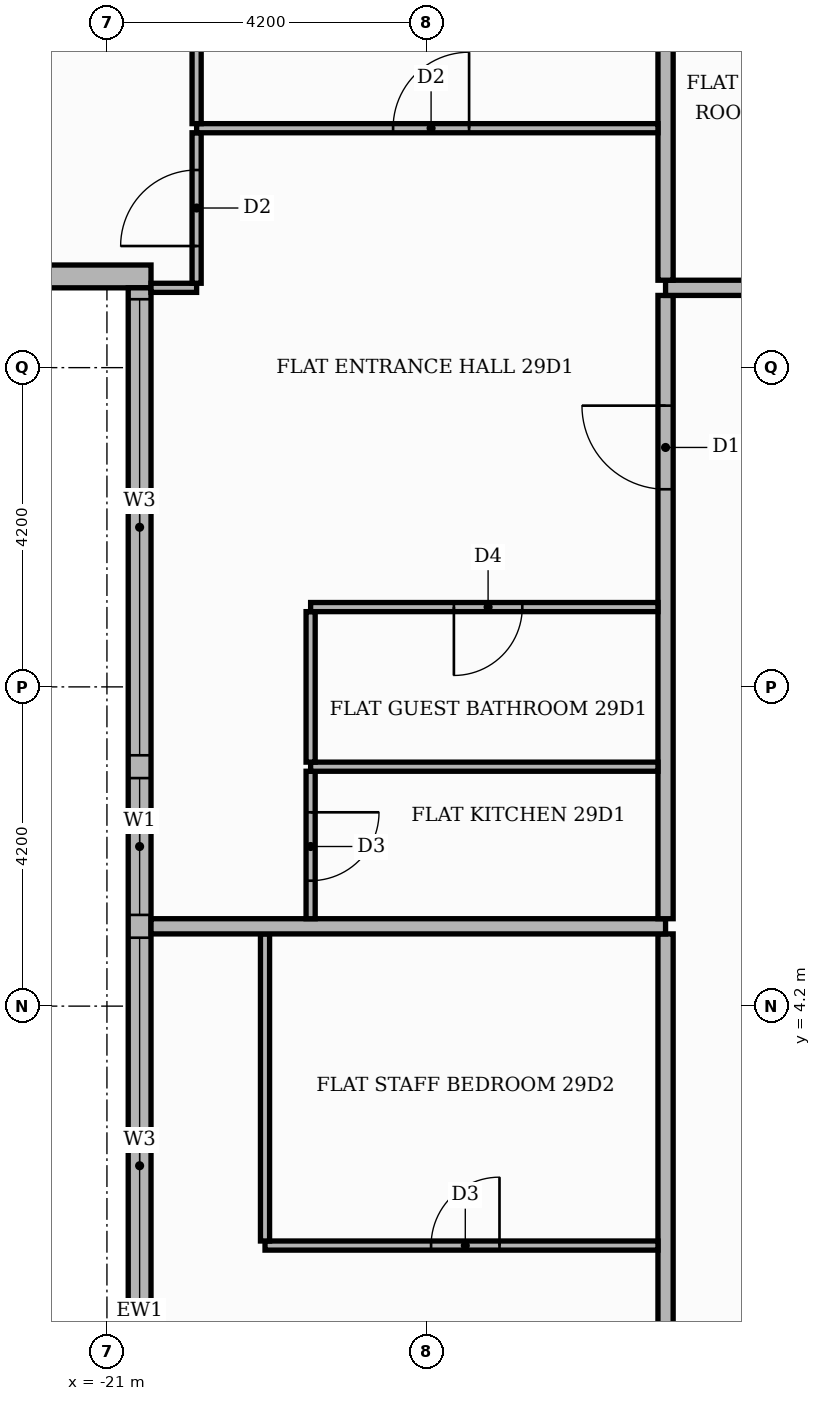
"""IFC4 building model, lengths in metres.
Left out: names, types, materials, properties, quantities, classifications, styles, units other than length and angle.
Written with IfcOpenShell. Run it as: python <this file> out.ifc"""

import sys

from ifc_helpers import new_model, si_unit, direction, frame, frame_2d, origin, place, context, subcontext, project, spatial, rectangle, extrude, element, fill, save


model = new_model("IFC4")
c1 = context("Model", 3, precision=1e-05, world=origin(), true_north=direction((0.0, 1.0)))
c2 = subcontext(c1, "Body", "Model", "MODEL_VIEW")
j1 = project(units=[si_unit("LENGTHUNIT", "METRE"), si_unit("PLANEANGLEUNIT", "RADIAN")], contexts=[c1])
p1 = place(None, origin())
s1 = spatial("IfcSite", under=j1, at=p1, CompositionType="ELEMENT")
p2 = place(p1, origin())
s2 = spatial("IfcBuilding", under=s1, at=p2, CompositionType="ELEMENT")
p3 = place(p2, frame((0.0, 0.0, 122.1)))
s3 = spatial("IfcBuildingStorey", under=s2, at=p3, CompositionType="ELEMENT", Elevation=122.1)
p4 = place(p3, frame((-25.42, 13.8, 0.0), z_axis=(0.0, 0.0, 1.0), x_axis=(1.0, 0.0, 0.0)))
e1 = element("IfcWall", 1, at=p4, inside=s3, PredefinedType="STANDARD", context=c2, shape_type="SweptSolid", body=[
    extrude(rectangle(XDim=5.0, YDim=0.3, at=frame_2d((2.5, 0.0))), origin(), (0.0, 0.0, 1.0), 3.4),
])
p5 = place(p4, frame((1.42, 0.0, 0.9)))
e2 = element("IfcOpeningElement", 2, at=p5, cuts=e1, PredefinedType="OPENING", context=c2, shape_type="SweptSolid", body=[
    extrude(rectangle(XDim=1.8, YDim=2.1, at=frame_2d((0.9, 1.05))), frame((0.0, 0.16, 0.0), z_axis=(0.0, -1.0, 0.0), x_axis=(1.0, 0.0, 0.0)), (0.0, 0.0, 1.0), 0.32),
])
p6 = place(p3, frame((-20.57, 13.65, 0.0), z_axis=(0.0, 0.0, 1.0), x_axis=(0.0, -1.0, 0.0)))
e3 = element("IfcWall", 3, at=p6, inside=s3, PredefinedType="STANDARD", context=c2, shape_type="SweptSolid", body=[
    extrude(rectangle(XDim=27.6, YDim=0.3, at=frame_2d((13.8, 0.0))), origin(), (0.0, 0.0, 1.0), 3.4),
])
p7 = place(p6, frame((0.15, 0.0, 0.9)))
e4 = element("IfcOpeningElement", 4, at=p7, cuts=e3, PredefinedType="OPENING", context=c2, shape_type="SweptSolid", body=[
    extrude(rectangle(XDim=6.0, YDim=2.1, at=frame_2d((3.0, 1.05))), frame((0.0, 0.16, 0.0), z_axis=(0.0, -1.0, 0.0), x_axis=(1.0, 0.0, 0.0)), (0.0, 0.0, 1.0), 0.32),
])
p8 = place(p6, frame((6.45, 0.0, 0.9)))
e5 = element("IfcOpeningElement", 5, at=p8, cuts=e3, PredefinedType="OPENING", context=c2, shape_type="SweptSolid", body=[
    extrude(rectangle(XDim=1.8, YDim=2.1, at=frame_2d((0.9, 1.05))), frame((0.0, 0.16, 0.0), z_axis=(0.0, -1.0, 0.0), x_axis=(1.0, 0.0, 0.0)), (0.0, 0.0, 1.0), 0.32),
])
p9 = place(p6, frame((8.55, 0.0, 0.9)))
e6 = element("IfcOpeningElement", 6, at=p9, cuts=e3, PredefinedType="OPENING", context=c2, shape_type="SweptSolid", body=[
    extrude(rectangle(XDim=6.0, YDim=2.1, at=frame_2d((3.0, 1.05))), frame((0.0, 0.16, 0.0), z_axis=(0.0, -1.0, 0.0), x_axis=(1.0, 0.0, 0.0)), (0.0, 0.0, 1.0), 0.32),
])
p10 = place(p6, frame((14.85, 0.0, 0.9)))
e7 = element("IfcOpeningElement", 7, at=p10, cuts=e3, PredefinedType="OPENING", context=c2, shape_type="SweptSolid", body=[
    extrude(rectangle(XDim=6.0, YDim=2.1, at=frame_2d((3.0, 1.05))), frame((0.0, 0.16, 0.0), z_axis=(0.0, -1.0, 0.0), x_axis=(1.0, 0.0, 0.0)), (0.0, 0.0, 1.0), 0.32),
])
p11 = place(p6, frame((21.15, 0.0, 0.9)))
e8 = element("IfcOpeningElement", 8, at=p11, cuts=e3, PredefinedType="OPENING", context=c2, shape_type="SweptSolid", body=[
    extrude(rectangle(XDim=6.0, YDim=2.1, at=frame_2d((3.0, 1.05))), frame((0.0, 0.16, 0.0), z_axis=(0.0, -1.0, 0.0), x_axis=(1.0, 0.0, 0.0)), (0.0, 0.0, 1.0), 0.32),
])
p12 = place(p3, frame((-13.65, -13.55, 0.0), z_axis=(0.0, 0.0, 1.0), x_axis=(0.0, 1.0, 0.0)))
e9 = element("IfcWall", 9, at=p12, inside=s3, PredefinedType="PARTITIONING", context=c2, shape_type="SweptSolid", body=[
    extrude(rectangle(XDim=18.7, YDim=0.2, at=frame_2d((9.35, 0.0))), origin(), (0.0, 0.0, 1.0), 3.4),
])
p13 = place(p12, frame((11.95, 0.0, 0.0)))
e10 = element("IfcOpeningElement", 10, at=p13, cuts=e9, PredefinedType="OPENING", context=c2, shape_type="SweptSolid", body=[
    extrude(rectangle(XDim=1.1, YDim=2.4, at=frame_2d((0.55, 1.2))), frame((0.0, 0.11, 0.0), z_axis=(0.0, -1.0, 0.0), x_axis=(1.0, 0.0, 0.0)), (0.0, 0.0, 1.0), 0.22),
])
p14 = place(p3, frame((-18.92, 1.05, 0.0), z_axis=(0.0, 0.0, 1.0), x_axis=(1.0, 0.0, 0.0)))
e11 = element("IfcWall", 11, at=p14, inside=s3, PredefinedType="PARTITIONING", context=c2, shape_type="SweptSolid", body=[
    extrude(rectangle(XDim=5.17, YDim=0.12, at=frame_2d((2.585, 0.0))), origin(), (0.0, 0.0, 1.0), 3.4),
])
p15 = place(p14, frame((2.185, 0.0, 0.0)))
e12 = element("IfcOpeningElement", 12, at=p15, cuts=e11, PredefinedType="OPENING", context=c2, shape_type="SweptSolid", body=[
    extrude(rectangle(XDim=0.9, YDim=2.1, at=frame_2d((0.45, 1.05))), frame((0.0, 0.07, 0.0), z_axis=(0.0, -1.0, 0.0), x_axis=(1.0, 0.0, 0.0)), (0.0, 0.0, 1.0), 0.14),
])
p16 = place(p3, frame((-18.92, 1.11, 0.0), z_axis=(0.0, 0.0, 1.0), x_axis=(0.0, 1.0, 0.0)))
e13 = element("IfcWall", 13, at=p16, inside=s3, PredefinedType="PARTITIONING", context=c2, shape_type="SweptSolid", body=[
    extrude(rectangle(XDim=4.04, YDim=0.12, at=frame_2d((2.02, 0.0))), origin(), (0.0, 0.0, 1.0), 3.4),
])
p17 = place(p3, frame((-20.42, 5.25, 0.0), z_axis=(0.0, 0.0, 1.0), x_axis=(1.0, 0.0, 0.0)))
e14 = element("IfcWall", 14, at=p17, inside=s3, PredefinedType="PARTITIONING", context=c2, shape_type="SweptSolid", body=[
    extrude(rectangle(XDim=6.77, YDim=0.2, at=frame_2d((3.385, 0.0))), origin(), (0.0, 0.0, 1.0), 3.4),
])
p18 = place(p3, frame((-18.32, 5.35, 0.0), z_axis=(0.0, 0.0, 1.0), x_axis=(0.0, 1.0, 0.0)))
e15 = element("IfcWall", 15, at=p18, inside=s3, PredefinedType="PARTITIONING", context=c2, shape_type="SweptSolid", body=[
    extrude(rectangle(XDim=1.94, YDim=0.12, at=frame_2d((0.97, 0.0))), origin(), (0.0, 0.0, 1.0), 3.4),
])
p19 = place(p18, frame((0.5, 0.0, 0.0)))
e16 = element("IfcOpeningElement", 16, at=p19, cuts=e15, PredefinedType="OPENING", context=c2, shape_type="SweptSolid", body=[
    extrude(rectangle(XDim=0.9, YDim=2.1, at=frame_2d((0.45, 1.05))), frame((0.0, 0.07, 0.0), z_axis=(0.0, -1.0, 0.0), x_axis=(1.0, 0.0, 0.0)), (0.0, 0.0, 1.0), 0.14),
])
p20 = place(p3, frame((-13.65, 5.35, 0.0), z_axis=(0.0, 0.0, 1.0), x_axis=(0.0, 1.0, 0.0)))
e17 = element("IfcWall", 17, at=p20, inside=s3, PredefinedType="PARTITIONING", context=c2, shape_type="SweptSolid", body=[
    extrude(rectangle(XDim=8.2, YDim=0.2, at=frame_2d((4.1, 0.0))), origin(), (0.0, 0.0, 1.0), 3.4),
])
p21 = place(p20, frame((5.65, 0.0, 0.0)))
e18 = element("IfcOpeningElement", 18, at=p21, cuts=e17, PredefinedType="OPENING", context=c2, shape_type="SweptSolid", body=[
    extrude(rectangle(XDim=1.1, YDim=2.4, at=frame_2d((0.55, 1.2))), frame((0.0, 0.11, 0.0), z_axis=(0.0, -1.0, 0.0), x_axis=(1.0, 0.0, 0.0)), (0.0, 0.0, 1.0), 0.22),
])
p22 = place(p3, frame((-18.32, 7.35, 0.0), z_axis=(0.0, 0.0, 1.0), x_axis=(1.0, 0.0, 0.0)))
e19 = element("IfcWall", 19, at=p22, inside=s3, PredefinedType="PARTITIONING", context=c2, shape_type="SweptSolid", body=[
    extrude(rectangle(XDim=4.57, YDim=0.12, at=frame_2d((2.285, 0.0))), origin(), (0.0, 0.0, 1.0), 3.4),
])
p23 = place(p3, frame((-18.32, 7.41, 0.0), z_axis=(0.0, 0.0, 1.0), x_axis=(0.0, 1.0, 0.0)))
e20 = element("IfcWall", 20, at=p23, inside=s3, PredefinedType="PARTITIONING", context=c2, shape_type="SweptSolid", body=[
    extrude(rectangle(XDim=1.98, YDim=0.12, at=frame_2d((0.99, 0.0))), origin(), (0.0, 0.0, 1.0), 3.4),
])
p24 = place(p3, frame((-18.32, 9.45, 0.0), z_axis=(0.0, 0.0, 1.0), x_axis=(1.0, 0.0, 0.0)))
e21 = element("IfcWall", 21, at=p24, inside=s3, PredefinedType="PARTITIONING", context=c2, shape_type="SweptSolid", body=[
    extrude(rectangle(XDim=4.57, YDim=0.12, at=frame_2d((2.285, 0.0))), origin(), (0.0, 0.0, 1.0), 3.4),
])
p25 = place(p24, frame((1.885, 0.0, 0.0)))
e22 = element("IfcOpeningElement", 22, at=p25, cuts=e21, PredefinedType="OPENING", context=c2, shape_type="SweptSolid", body=[
    extrude(rectangle(XDim=0.9, YDim=2.1, at=frame_2d((0.45, 1.05))), frame((0.0, 0.07, 0.0), z_axis=(0.0, -1.0, 0.0), x_axis=(1.0, 0.0, 0.0)), (0.0, 0.0, 1.0), 0.14),
])
p26 = place(p3, frame((-20.42, 13.65, 0.0), z_axis=(0.0, 0.0, 1.0), x_axis=(1.0, 0.0, 0.0)))
e23 = element("IfcWall", 23, at=p26, inside=s3, PredefinedType="PARTITIONING", context=c2, shape_type="SweptSolid", body=[
    extrude(rectangle(XDim=0.6, YDim=0.12, at=frame_2d((0.3, 0.0))), origin(), (0.0, 0.0, 1.0), 3.4),
])
p27 = place(p3, frame((-13.65, 13.65, 0.0), z_axis=(0.0, 0.0, 1.0), x_axis=(1.0, 0.0, 0.0)))
e24 = element("IfcWall", 24, at=p27, inside=s3, PredefinedType="PARTITIONING", context=c2, shape_type="SweptSolid", body=[
    extrude(rectangle(XDim=39.07, YDim=0.2, at=frame_2d((19.535, 0.0))), origin(), (0.0, 0.0, 1.0), 3.4),
])
p28 = place(p27, frame((24.65, 0.0, 0.0)))
e25 = element("IfcOpeningElement", 25, at=p28, cuts=e24, PredefinedType="OPENING", context=c2, shape_type="SweptSolid", body=[
    extrude(rectangle(XDim=1.1, YDim=2.4, at=frame_2d((0.55, 1.2))), frame((0.0, 0.11, 0.0), z_axis=(0.0, -1.0, 0.0), x_axis=(1.0, 0.0, 0.0)), (0.0, 0.0, 1.0), 0.22),
])
p29 = place(p27, frame((12.05, 0.0, 0.0)))
e26 = element("IfcOpeningElement", 26, at=p29, cuts=e24, PredefinedType="OPENING", context=c2, shape_type="SweptSolid", body=[
    extrude(rectangle(XDim=1.1, YDim=2.4, at=frame_2d((0.55, 1.2))), frame((0.0, 0.11, 0.0), z_axis=(0.0, -1.0, 0.0), x_axis=(1.0, 0.0, 0.0)), (0.0, 0.0, 1.0), 0.22),
])
p30 = place(p3, frame((-19.82, 13.71, 0.0), z_axis=(0.0, 0.0, 1.0), x_axis=(0.0, 1.0, 0.0)))
e27 = element("IfcWall", 27, at=p30, inside=s3, PredefinedType="PARTITIONING", context=c2, shape_type="SweptSolid", body=[
    extrude(rectangle(XDim=1.98, YDim=0.12, at=frame_2d((0.99, 0.0))), origin(), (0.0, 0.0, 1.0), 3.4),
])
p31 = place(p30, frame((0.49, 0.0, 0.0)))
e28 = element("IfcOpeningElement", 28, at=p31, cuts=e27, PredefinedType="OPENING", context=c2, shape_type="SweptSolid", body=[
    extrude(rectangle(XDim=1.0, YDim=2.1, at=frame_2d((0.5, 1.05))), frame((0.0, 0.07, 0.0), z_axis=(0.0, -1.0, 0.0), x_axis=(1.0, 0.0, 0.0)), (0.0, 0.0, 1.0), 0.14),
])
p32 = place(p3, frame((-13.65, 13.75, 0.0), z_axis=(0.0, 0.0, 1.0), x_axis=(0.0, 1.0, 0.0)))
e29 = element("IfcWall", 29, at=p32, inside=s3, PredefinedType="PARTITIONING", context=c2, shape_type="SweptSolid", body=[
    extrude(rectangle(XDim=11.67, YDim=0.2, at=frame_2d((5.835, 0.0))), origin(), (0.0, 0.0, 1.0), 3.4),
])
p33 = place(p3, frame((-19.82, 15.75, 0.0), z_axis=(0.0, 0.0, 1.0), x_axis=(1.0, 0.0, 0.0)))
e30 = element("IfcWall", 30, at=p33, inside=s3, PredefinedType="PARTITIONING", context=c2, shape_type="SweptSolid", body=[
    extrude(rectangle(XDim=6.07, YDim=0.12, at=frame_2d((3.035, 0.0))), origin(), (0.0, 0.0, 1.0), 3.4),
])
p34 = place(p33, frame((2.585, 0.0, 0.0)))
e31 = element("IfcOpeningElement", 31, at=p34, cuts=e30, PredefinedType="OPENING", context=c2, shape_type="SweptSolid", body=[
    extrude(rectangle(XDim=1.0, YDim=2.1, at=frame_2d((0.5, 1.05))), frame((0.0, 0.07, 0.0), z_axis=(0.0, -1.0, 0.0), x_axis=(1.0, 0.0, 0.0)), (0.0, 0.0, 1.0), 0.14),
])
p35 = place(p3, frame((-19.82, 15.81, 0.0), z_axis=(0.0, 0.0, 1.0), x_axis=(0.0, 1.0, 0.0)))
e32 = element("IfcWall", 32, at=p35, inside=s3, PredefinedType="PARTITIONING", context=c2, shape_type="SweptSolid", body=[
    extrude(rectangle(XDim=1.59, YDim=0.12, at=frame_2d((0.795, 0.0))), origin(), (0.0, 0.0, 1.0), 3.4),
])
p36 = place(p7, origin())
e33 = element("IfcWindow", 33, at=p36, inside=s3, PartitioningType="SINGLE_PANEL", PredefinedType="WINDOW", context=c2, shape_type="SweptSolid", body=[
    extrude(rectangle(XDim=6.0, YDim=2.1, at=frame_2d((3.0, 1.05))), frame((0.0, 0.03, 0.0), z_axis=(0.0, -1.0, 0.0), x_axis=(1.0, 0.0, 0.0)), (0.0, 0.0, 1.0), 0.06),
])
fill(e4, e33)
p37 = place(p8, origin())
e34 = element("IfcWindow", 34, at=p37, inside=s3, PartitioningType="SINGLE_PANEL", PredefinedType="WINDOW", context=c2, shape_type="SweptSolid", body=[
    extrude(rectangle(XDim=1.8, YDim=2.1, at=frame_2d((0.9, 1.05))), frame((0.0, 0.03, 0.0), z_axis=(0.0, -1.0, 0.0), x_axis=(1.0, 0.0, 0.0)), (0.0, 0.0, 1.0), 0.06),
])
fill(e5, e34)
p38 = place(p9, origin())
e35 = element("IfcWindow", 35, at=p38, inside=s3, PartitioningType="SINGLE_PANEL", PredefinedType="WINDOW", context=c2, shape_type="SweptSolid", body=[
    extrude(rectangle(XDim=6.0, YDim=2.1, at=frame_2d((3.0, 1.05))), frame((0.0, 0.03, 0.0), z_axis=(0.0, -1.0, 0.0), x_axis=(1.0, 0.0, 0.0)), (0.0, 0.0, 1.0), 0.06),
])
fill(e6, e35)
p39 = place(p21, origin())
e36 = element("IfcDoor", 36, at=p39, inside=s3, OperationType="SINGLE_SWING_RIGHT", PredefinedType="DOOR", context=c2, shape_type="SweptSolid", body=[
    extrude(rectangle(XDim=1.1, YDim=2.4, at=frame_2d((0.55, 1.2))), frame((0.0, 0.025, 0.0), z_axis=(0.0, -1.0, 0.0), x_axis=(1.0, 0.0, 0.0)), (0.0, 0.0, 1.0), 0.05),
])
fill(e18, e36)
p40 = place(p34, origin())
e37 = element("IfcDoor", 37, at=p40, inside=s3, OperationType="SINGLE_SWING_RIGHT", PredefinedType="DOOR", context=c2, shape_type="SweptSolid", body=[
    extrude(rectangle(XDim=1.0, YDim=2.1, at=frame_2d((0.5, 1.05))), frame((0.0, 0.025, 0.0), z_axis=(0.0, -1.0, 0.0), x_axis=(1.0, 0.0, 0.0)), (0.0, 0.0, 1.0), 0.05),
])
fill(e31, e37)
p41 = place(p25, frame((0.9, 0.0, 0.0), z_axis=(0.0, 0.0, 1.0), x_axis=(-1.0, 0.0, 0.0)))
e38 = element("IfcDoor", 38, at=p41, inside=s3, OperationType="SINGLE_SWING_LEFT", PredefinedType="DOOR", context=c2, shape_type="SweptSolid", body=[
    extrude(rectangle(XDim=0.9, YDim=2.1, at=frame_2d((0.45, 1.05))), frame((0.0, 0.025, 0.0), z_axis=(0.0, -1.0, 0.0), x_axis=(1.0, 0.0, 0.0)), (0.0, 0.0, 1.0), 0.05),
])
fill(e22, e38)
p42 = place(p19, frame((0.9, 0.0, 0.0), z_axis=(0.0, 0.0, 1.0), x_axis=(-1.0, 0.0, 0.0)))
e39 = element("IfcDoor", 39, at=p42, inside=s3, OperationType="SINGLE_SWING_RIGHT", PredefinedType="DOOR", context=c2, shape_type="SweptSolid", body=[
    extrude(rectangle(XDim=0.9, YDim=2.1, at=frame_2d((0.45, 1.05))), frame((0.0, 0.025, 0.0), z_axis=(0.0, -1.0, 0.0), x_axis=(1.0, 0.0, 0.0)), (0.0, 0.0, 1.0), 0.05),
])
fill(e16, e39)
p43 = place(p31, origin())
e40 = element("IfcDoor", 40, at=p43, inside=s3, OperationType="SINGLE_SWING_LEFT", PredefinedType="DOOR", context=c2, shape_type="SweptSolid", body=[
    extrude(rectangle(XDim=1.0, YDim=2.1, at=frame_2d((0.5, 1.05))), frame((0.0, 0.025, 0.0), z_axis=(0.0, -1.0, 0.0), x_axis=(1.0, 0.0, 0.0)), (0.0, 0.0, 1.0), 0.05),
])
fill(e28, e40)
p44 = place(p15, origin())
e41 = element("IfcDoor", 41, at=p44, inside=s3, OperationType="SINGLE_SWING_RIGHT", PredefinedType="DOOR", context=c2, shape_type="SweptSolid", body=[
    extrude(rectangle(XDim=0.9, YDim=2.1, at=frame_2d((0.45, 1.05))), frame((0.0, 0.025, 0.0), z_axis=(0.0, -1.0, 0.0), x_axis=(1.0, 0.0, 0.0)), (0.0, 0.0, 1.0), 0.05),
])
fill(e12, e41)
save(model, sys.argv[1])
